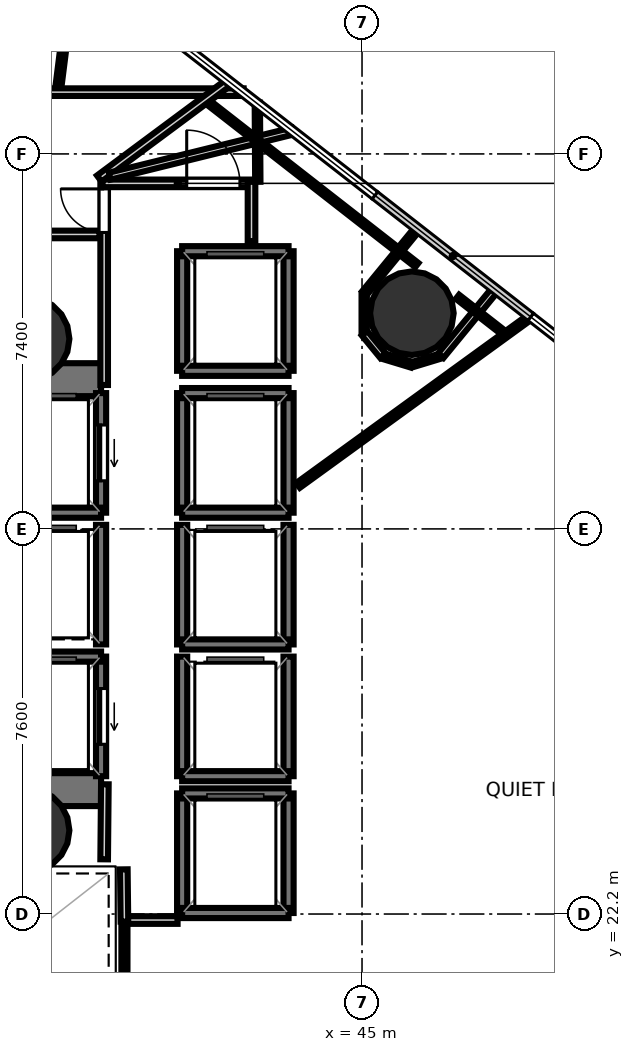
"""IFC4 building model, lengths in metres.
Left out: names, types, materials, properties, quantities, classifications, styles, units other than length and angle.
Written with IfcOpenShell. Run it as: python <this file> out.ifc"""

import sys

from ifc_helpers import new_model, si_unit, direction, frame, frame_2d, origin, origin_2d, place, context, subcontext, project, spatial, rectangle, hollow_circle, extrude, element, fill, save


model = new_model("IFC4")
c1 = context("Model", 3, precision=1e-05, world=origin(), true_north=direction((0.0, 1.0)))
c2 = subcontext(c1, "Body", "Model", "MODEL_VIEW")
j1 = project(units=[si_unit("LENGTHUNIT", "METRE"), si_unit("PLANEANGLEUNIT", "RADIAN")], contexts=[c1])
p1 = place(None, origin())
s1 = spatial("IfcSite", under=j1, at=p1, CompositionType="ELEMENT")
p2 = place(p1, origin())
s2 = spatial("IfcBuilding", under=s1, at=p2, CompositionType="ELEMENT")
p3 = place(p2, frame((0.0, 0.0, 85.8)))
s3 = spatial("IfcBuildingStorey", under=s2, at=p3, CompositionType="ELEMENT", Elevation=85.8)
p4 = place(p3, frame((29.13, 32.745, 0.0), z_axis=(0.0, 0.0, 1.0), x_axis=(1.0, 0.0, 0.0)))
e1 = element("IfcWall", 1, at=p4, inside=s3, PredefinedType="SHEAR", context=c2, shape_type="SweptSolid", body=[
    extrude(rectangle(XDim=10.72, YDim=0.65, at=frame_2d((5.36, 0.0))), origin(), (0.0, 0.0, 1.0), 3.52),
])
p5 = place(p4, frame((1.095, 0.0, 0.0)))
e2 = element("IfcOpeningElement", 2, at=p5, cuts=e1, PredefinedType="OPENING", context=c2, shape_type="SweptSolid", body=[
    extrude(rectangle(XDim=1.25, YDim=2.15, at=frame_2d((0.625, 1.075))), frame((0.0, 0.335, 0.0), z_axis=(0.0, -1.0, 0.0), x_axis=(1.0, 0.0, 0.0)), (0.0, 0.0, 1.0), 0.67),
])
p6 = place(p3, frame((29.13, 24.655, 0.0), z_axis=(0.0, 0.0, 1.0), x_axis=(1.0, 0.0, 0.0)))
e3 = element("IfcWall", 3, at=p6, inside=s3, PredefinedType="SHEAR", context=c2, shape_type="SweptSolid", body=[
    extrude(rectangle(XDim=10.72, YDim=0.65, at=frame_2d((5.36, 0.0))), origin(), (0.0, 0.0, 1.0), 3.52),
])
p7 = place(p6, frame((0.895, 0.0, 0.0)))
e4 = element("IfcOpeningElement", 4, at=p7, cuts=e3, PredefinedType="OPENING", context=c2, shape_type="SweptSolid", body=[
    extrude(rectangle(XDim=1.25, YDim=2.15, at=frame_2d((0.625, 1.075))), frame((0.0, 0.335, 0.0), z_axis=(0.0, -1.0, 0.0), x_axis=(1.0, 0.0, 0.0)), (0.0, 0.0, 1.0), 0.67),
])
for number, where, z_axis, x_axis in (
    (5, (38.4, 33.55, 0.0), (0.0, 0.0, 1.0), (1.0, 0.0, 0.0)),
    (6, (38.4, 23.85, 0.0), (0.0, 0.0, 1.0), (1.0, 0.0, 0.0)),
    (7, (45.984, 34.057, 0.0), (0.0, 0.0, 1.0), (1.0, 0.0, 0.0)),
):
    element("IfcColumn", number, at=place(p3, frame(where, z_axis=z_axis, x_axis=x_axis)), inside=s3, PredefinedType="COLUMN", context=c2, shape_type="SweptSolid", body=[
        extrude(hollow_circle(Radius=0.825, WallThickness=0.04, at=origin_2d()), origin(), (0.0, 0.0, 1.0), 3.7),
    ])
p8 = place(p3, frame((39.85, 30.12, 0.0), z_axis=(0.0, 0.0, 1.0), x_axis=(0.0, 1.0, 0.0)))
e8 = element("IfcWall", 8, at=p8, inside=s3, PredefinedType="SOLIDWALL", context=c2, shape_type="SweptSolid", body=[
    extrude(rectangle(XDim=2.36, YDim=0.2, at=frame_2d((1.18, 0.0))), origin(), (0.0, 0.0, 1.0), 3.52),
])
p9 = place(p8, frame((0.63, 0.0, 0.0)))
e9 = element("IfcOpeningElement", 9, at=p9, cuts=e8, PredefinedType="OPENING", context=c2, shape_type="SweptSolid", body=[
    extrude(rectangle(XDim=1.1, YDim=2.15, at=frame_2d((0.55, 1.075))), frame((0.0, 0.11, 0.0), z_axis=(0.0, -1.0, 0.0), x_axis=(1.0, 0.0, 0.0)), (0.0, 0.0, 1.0), 0.22),
])
p10 = place(p3, frame((37.75, 30.12, 0.0), z_axis=(0.0, 0.0, 1.0), x_axis=(1.0, 0.0, 0.0)))
e10 = element("IfcWall", 10, at=p10, inside=s3, PredefinedType="SOLIDWALL", context=c2, shape_type="SweptSolid", body=[
    extrude(rectangle(XDim=2.1, YDim=0.2, at=frame_2d((1.05, 0.0))), origin(), (0.0, 0.0, 1.0), 3.52),
])
p11 = place(p3, frame((39.85, 24.92, 0.0), z_axis=(0.0, 0.0, 1.0), x_axis=(0.0, 1.0, 0.0)))
e11 = element("IfcWall", 11, at=p11, inside=s3, PredefinedType="SOLIDWALL", context=c2, shape_type="SweptSolid", body=[
    extrude(rectangle(XDim=2.36, YDim=0.2, at=frame_2d((1.18, 0.0))), origin(), (0.0, 0.0, 1.0), 3.52),
])
p12 = place(p11, frame((0.63, 0.0, 0.0)))
e12 = element("IfcOpeningElement", 12, at=p12, cuts=e11, PredefinedType="OPENING", context=c2, shape_type="SweptSolid", body=[
    extrude(rectangle(XDim=1.1, YDim=2.15, at=frame_2d((0.55, 1.075))), frame((0.0, 0.11, 0.0), z_axis=(0.0, -1.0, 0.0), x_axis=(1.0, 0.0, 0.0)), (0.0, 0.0, 1.0), 0.22),
])
p13 = place(p3, frame((37.75, 27.28, 0.0), z_axis=(0.0, 0.0, 1.0), x_axis=(1.0, 0.0, 0.0)))
e13 = element("IfcWall", 13, at=p13, inside=s3, PredefinedType="SOLIDWALL", context=c2, shape_type="SweptSolid", body=[
    extrude(rectangle(XDim=2.1, YDim=0.2, at=frame_2d((1.05, 0.0))), origin(), (0.0, 0.0, 1.0), 3.52),
])
for number, where, z_axis, x_axis in (
    (14, (43.55, 30.12, 0.0), (0.0, 0.0, 1.0), (0.0, 1.0, 0.0)),
    (15, (41.45, 30.12, 0.0), (0.0, 0.0, 1.0), (0.0, 1.0, 0.0)),
):
    element("IfcWall", number, at=place(p3, frame(where, z_axis=z_axis, x_axis=x_axis)), inside=s3, PredefinedType="SOLIDWALL", context=c2, shape_type="SweptSolid", body=[
        extrude(rectangle(XDim=2.36, YDim=0.2, at=frame_2d((1.18, 0.0))), origin(), (0.0, 0.0, 1.0), 3.52),
    ])
for number, where, z_axis, x_axis in (
    (16, (41.45, 32.48, 0.0), (0.0, 0.0, 1.0), (1.0, 0.0, 0.0)),
    (17, (41.45, 30.12, 0.0), (0.0, 0.0, 1.0), (1.0, 0.0, 0.0)),
):
    element("IfcWall", number, at=place(p3, frame(where, z_axis=z_axis, x_axis=x_axis)), inside=s3, PredefinedType="SOLIDWALL", context=c2, shape_type="SweptSolid", body=[
        extrude(rectangle(XDim=2.1, YDim=0.2, at=frame_2d((1.05, 0.0))), origin(), (0.0, 0.0, 1.0), 3.52),
    ])
for number, where, z_axis, x_axis in (
    (18, (43.55, 27.52, 0.0), (0.0, 0.0, 1.0), (0.0, 1.0, 0.0)),
    (19, (41.45, 27.52, 0.0), (0.0, 0.0, 1.0), (0.0, 1.0, 0.0)),
):
    element("IfcWall", number, at=place(p3, frame(where, z_axis=z_axis, x_axis=x_axis)), inside=s3, PredefinedType="SOLIDWALL", context=c2, shape_type="SweptSolid", body=[
        extrude(rectangle(XDim=2.36, YDim=0.2, at=frame_2d((1.18, 0.0))), origin(), (0.0, 0.0, 1.0), 3.52),
    ])
p14 = place(p3, frame((41.45, 27.52, 0.0), z_axis=(0.0, 0.0, 1.0), x_axis=(1.0, 0.0, 0.0)))
e20 = element("IfcWall", 20, at=p14, inside=s3, PredefinedType="SOLIDWALL", context=c2, shape_type="SweptSolid", body=[
    extrude(rectangle(XDim=2.1, YDim=0.2, at=frame_2d((1.05, 0.0))), origin(), (0.0, 0.0, 1.0), 3.52),
])
for number, where, z_axis, x_axis in (
    (21, (43.55, 24.92, 0.0), (0.0, 0.0, 1.0), (0.0, 1.0, 0.0)),
    (22, (41.45, 24.92, 0.0), (0.0, 0.0, 1.0), (0.0, 1.0, 0.0)),
):
    element("IfcWall", number, at=place(p3, frame(where, z_axis=z_axis, x_axis=x_axis)), inside=s3, PredefinedType="SOLIDWALL", context=c2, shape_type="SweptSolid", body=[
        extrude(rectangle(XDim=2.36, YDim=0.2, at=frame_2d((1.18, 0.0))), origin(), (0.0, 0.0, 1.0), 3.52),
    ])
p15 = place(p3, frame((41.45, 24.92, 0.0), z_axis=(0.0, 0.0, 1.0), x_axis=(1.0, 0.0, 0.0)))
e23 = element("IfcWall", 23, at=p15, inside=s3, PredefinedType="SOLIDWALL", context=c2, shape_type="SweptSolid", body=[
    extrude(rectangle(XDim=2.1, YDim=0.2, at=frame_2d((1.05, 0.0))), origin(), (0.0, 0.0, 1.0), 3.52),
])
p16 = place(p3, frame((39.85, 27.52, 0.0), z_axis=(0.0, 0.0, 1.0), x_axis=(0.0, 1.0, 0.0)))
e24 = element("IfcWall", 24, at=p16, inside=s3, PredefinedType="SOLIDWALL", context=c2, shape_type="SweptSolid", body=[
    extrude(rectangle(XDim=2.36, YDim=0.2, at=frame_2d((1.18, 0.0))), origin(), (0.0, 0.0, 1.0), 3.52),
])
for number, where, z_axis, x_axis in (
    (25, (43.55, 22.22, 0.0), (0.0, 0.0, 1.0), (0.0, 1.0, 0.0)),
    (26, (41.45, 22.22, 0.0), (0.0, 0.0, 1.0), (0.0, 1.0, 0.0)),
):
    element("IfcWall", number, at=place(p3, frame(where, z_axis=z_axis, x_axis=x_axis)), inside=s3, PredefinedType="SOLIDWALL", context=c2, shape_type="SweptSolid", body=[
        extrude(rectangle(XDim=2.36, YDim=0.2, at=frame_2d((1.18, 0.0))), origin(), (0.0, 0.0, 1.0), 3.52),
    ])
for number, where, z_axis, x_axis in (
    (27, (41.45, 24.58, 0.0), (0.0, 0.0, 1.0), (1.0, 0.0, 0.0)),
    (28, (41.45, 22.22, 0.0), (0.0, 0.0, 1.0), (1.0, 0.0, 0.0)),
):
    element("IfcWall", number, at=place(p3, frame(where, z_axis=z_axis, x_axis=x_axis)), inside=s3, PredefinedType="SOLIDWALL", context=c2, shape_type="SweptSolid", body=[
        extrude(rectangle(XDim=2.1, YDim=0.2, at=frame_2d((1.05, 0.0))), origin(), (0.0, 0.0, 1.0), 3.52),
    ])
for number, where, z_axis, x_axis in (
    (29, (43.55, 32.92, 0.0), (0.0, 0.0, 1.0), (0.0, 1.0, 0.0)),
    (30, (41.45, 32.92, 0.0), (0.0, 0.0, 1.0), (0.0, 1.0, 0.0)),
):
    element("IfcWall", number, at=place(p3, frame(where, z_axis=z_axis, x_axis=x_axis)), inside=s3, PredefinedType="SOLIDWALL", context=c2, shape_type="SweptSolid", body=[
        extrude(rectangle(XDim=2.36, YDim=0.2, at=frame_2d((1.18, 0.0))), origin(), (0.0, 0.0, 1.0), 3.52),
    ])
for number, where, z_axis, x_axis in (
    (31, (41.45, 35.28, 0.0), (0.0, 0.0, 1.0), (1.0, 0.0, 0.0)),
    (32, (41.45, 32.92, 0.0), (0.0, 0.0, 1.0), (1.0, 0.0, 0.0)),
):
    element("IfcWall", number, at=place(p3, frame(where, z_axis=z_axis, x_axis=x_axis)), inside=s3, PredefinedType="SOLIDWALL", context=c2, shape_type="SweptSolid", body=[
        extrude(rectangle(XDim=2.1, YDim=0.2, at=frame_2d((1.05, 0.0))), origin(), (0.0, 0.0, 1.0), 3.52),
    ])
p17 = place(p3, frame((39.911, 32.64, 0.0), z_axis=(0.0, 0.0, 1.0), x_axis=(0.0, 1.0, 0.0)))
e33 = element("IfcWall", 33, at=p17, inside=s3, PredefinedType="PARTITIONING", context=c2, shape_type="SweptSolid", body=[
    extrude(rectangle(XDim=4.01, YDim=0.15, at=frame_2d((2.005, 0.0))), origin(), (0.0, 0.0, 1.0), 2.84),
])
p18 = place(p17, frame((3.01, 0.0, 0.0)))
e34 = element("IfcOpeningElement", 34, at=p18, cuts=e33, PredefinedType="OPENING", context=c2, shape_type="SweptSolid", body=[
    extrude(rectangle(XDim=0.86, YDim=2.05, at=frame_2d((0.43, 1.025))), frame((0.0, 0.085, 0.0), z_axis=(0.0, -1.0, 0.0), x_axis=(1.0, 0.0, 0.0)), (0.0, 0.0, 1.0), 0.17),
])
p19 = place(p3, frame((39.88, 36.619, 0.0), z_axis=(0.0, 0.0, 1.0), x_axis=(1.0, 0.0, 0.0)))
e35 = element("IfcWall", 35, at=p19, inside=s3, PredefinedType="PARTITIONING", context=c2, shape_type="SweptSolid", body=[
    extrude(rectangle(XDim=2.97, YDim=0.15, at=frame_2d((1.485, 0.0))), origin(), (0.0, 0.0, 1.0), 2.798),
])
p20 = place(p19, frame((1.66, 0.0, 0.0)))
e36 = element("IfcOpeningElement", 36, at=p20, cuts=e35, PredefinedType="OPENING", context=c2, shape_type="SweptSolid", body=[
    extrude(rectangle(XDim=1.05, YDim=2.15, at=frame_2d((0.525, 1.075))), frame((0.0, 0.085, 0.0), z_axis=(0.0, -1.0, 0.0), x_axis=(1.0, 0.0, 0.0)), (0.0, 0.0, 1.0), 0.17),
])
p21 = place(p3, frame((42.819, 36.65, 0.0), z_axis=(0.0, 0.0, 1.0), x_axis=(0.0, -1.0, 0.0)))
e37 = element("IfcWall", 37, at=p21, inside=s3, PredefinedType="PARTITIONING", context=c2, shape_type="SweptSolid", body=[
    extrude(rectangle(XDim=1.17, YDim=0.15, at=frame_2d((0.585, 0.0))), origin(), (0.0, 0.0, 1.0), 2.798),
])
p22 = place(p3, frame((41.36, 22.081, 0.0), z_axis=(0.0, 0.0, 1.0), x_axis=(-1.0, 0.0, 0.0)))
e38 = element("IfcWall", 38, at=p22, inside=s3, PredefinedType="PARTITIONING", context=c2, shape_type="SweptSolid", body=[
    extrude(rectangle(XDim=1.08, YDim=0.15, at=frame_2d((0.54, 0.0))), origin(), (0.0, 0.0, 1.0), 2.84),
])
p23 = place(p3, frame((40.311, 22.05, 0.0), z_axis=(0.0, 0.0, 1.0), x_axis=(-0.011836292006, 0.999929948642, 0.0)))
e39 = element("IfcWall", 39, at=p23, inside=s3, PredefinedType="PARTITIONING", context=c2, shape_type="SweptSolid", body=[
    extrude(rectangle(XDim=1.031, YDim=0.15, at=frame_2d((0.516, 0.0))), origin(), (0.0, 0.0, 1.0), 2.84),
])
p24 = place(p3, frame((39.911, 23.28, 0.0), z_axis=(0.0, 0.0, 1.0), x_axis=(0.009397771291, 0.999955839972, 0.0)))
e40 = element("IfcWall", 40, at=p24, inside=s3, PredefinedType="PARTITIONING", context=c2, shape_type="SweptSolid", body=[
    extrude(rectangle(XDim=1.481, YDim=0.15, at=frame_2d((0.74, 0.0))), origin(), (0.0, 0.0, 1.0), 2.84),
])
p25 = place(p3, frame((26.42, 38.419, 0.0), z_axis=(0.0, 0.0, 1.0), x_axis=(1.0, 0.0, 0.0)))
e41 = element("IfcWall", 41, at=p25, inside=s3, PredefinedType="PARTITIONING", context=c2, shape_type="SweptSolid", body=[
    extrude(rectangle(XDim=16.243, YDim=0.15, at=frame_2d((8.122, 0.0))), origin(), (0.0, 0.0, 1.0), 2.798),
])
p26 = place(p25, frame((8.406, 0.0, 0.0)))
e42 = element("IfcOpeningElement", 42, at=p26, cuts=e41, PredefinedType="OPENING", context=c2, shape_type="SweptSolid", body=[
    extrude(rectangle(XDim=1.25, YDim=2.2, at=frame_2d((0.625, 1.1))), frame((0.0, 0.085, 0.0), z_axis=(0.0, -1.0, 0.0), x_axis=(1.0, 0.0, 0.0)), (0.0, 0.0, 1.0), 0.17),
])
p27 = place(p3, frame((42.398, 38.634, 0.0), z_axis=(0.0, 0.0, 1.0), x_axis=(-0.802766662885, -0.596293287704, 0.0)))
e43 = element("IfcWall", 43, at=p27, inside=s3, PredefinedType="PARTITIONING", context=c2, shape_type="SweptSolid", body=[
    extrude(rectangle(XDim=3.22, YDim=0.15, at=frame_2d((1.61, 0.0))), origin(), (0.0, 0.0, 1.0), 2.798),
])
p28 = place(p3, frame((39.818, 35.611, 0.0), z_axis=(0.0, 0.0, 1.0), x_axis=(-1.0, 0.0, 0.0)))
e44 = element("IfcWall", 44, at=p28, inside=s3, PredefinedType="PARTITIONING", context=c2, shape_type="SweptSolid", body=[
    extrude(rectangle(XDim=2.768, YDim=0.15, at=frame_2d((1.384, 0.0))), origin(), (0.0, 0.0, 1.0), 2.84),
])
p29 = place(p3, frame((40.311, 18.0, 0.0), z_axis=(0.0, 0.0, 1.0), x_axis=(0.0, 1.0, 0.0)))
e45 = element("IfcWall", 45, at=p29, inside=s3, PredefinedType="PARTITIONING", context=c2, shape_type="SweptSolid", body=[
    extrude(rectangle(XDim=3.97, YDim=0.12, at=frame_2d((1.985, 0.0))), origin(), (0.0, 0.0, 1.0), 2.84),
])
p30 = place(p3, frame((43.738, 30.659, 0.0), z_axis=(0.0, 0.0, 1.0), x_axis=(0.809324205452, 0.587362179979, 0.0)))
e46 = element("IfcWall", 46, at=p30, inside=s3, PredefinedType="PARTITIONING", context=c2, shape_type="SweptSolid", body=[
    extrude(rectangle(XDim=5.687, YDim=0.12, at=frame_2d((2.843, 0.0))), origin(), (0.0, 0.0, 1.0), 2.798),
])
p31 = place(p3, frame((42.943, 36.65, 0.0), z_axis=(0.0, 0.0, 1.0), x_axis=(-0.005939251293, 0.999982362491, 0.0)))
e47 = element("IfcWall", 47, at=p31, inside=s3, PredefinedType="PARTITIONING", context=c2, shape_type="SweptSolid", body=[
    extrude(rectangle(XDim=1.562, YDim=0.105, at=frame_2d((0.781, 0.0))), origin(), (0.0, 0.0, 1.0), 2.84),
])
p32 = place(p3, frame((43.629, 37.65, 0.0), z_axis=(0.0, 0.0, 1.0), x_axis=(-0.970941159408, -0.239318333958, 0.0)))
e48 = element("IfcWall", 48, at=p32, inside=s3, PredefinedType="PARTITIONING", context=c2, shape_type="SweptSolid", body=[
    extrude(rectangle(XDim=3.715, YDim=0.14, at=frame_2d((1.858, 0.0))), origin(), (0.0, 0.0, 1.0), 2.798),
])
p33 = place(p3, frame((41.998, 38.192, 0.0), z_axis=(0.0, 0.0, 1.0), x_axis=(0.78851647787, -0.615013629221, 0.0)))
e49 = element("IfcWall", 49, at=p33, inside=s3, PredefinedType="PARTITIONING", context=c2, shape_type="SweptSolid", body=[
    extrude(rectangle(XDim=5.18, YDim=0.105, at=frame_2d((2.59, 0.0))), origin(), (0.0, 0.0, 1.0), 2.798),
])
p34 = place(p3, frame((46.107, 35.742, 0.0), z_axis=(0.0, 0.0, 1.0), x_axis=(-0.634345789396, -0.773049428869, 0.0)))
e50 = element("IfcWall", 50, at=p34, inside=s3, PredefinedType="PARTITIONING", context=c2, shape_type="SweptSolid", body=[
    extrude(rectangle(XDim=1.667, YDim=0.12, at=frame_2d((0.833, 0.0))), origin(), (0.0, 0.0, 1.0), 2.798),
])
p35 = place(p3, frame((45.043, 34.434, 0.0), z_axis=(0.0, 0.0, 1.0), x_axis=(0.0, -1.0, 0.0)))
e51 = element("IfcWall", 51, at=p35, inside=s3, PredefinedType="PARTITIONING", context=c2, shape_type="SweptSolid", body=[
    extrude(rectangle(XDim=0.754, YDim=0.105, at=frame_2d((0.377, 0.0))), origin(), (0.0, 0.0, 1.0), 2.84),
])
p36 = place(p3, frame((45.05, 33.66, 0.0), z_axis=(0.0, 0.0, 1.0), x_axis=(0.634329694458, -0.773062635709, 0.0)))
e52 = element("IfcWall", 52, at=p36, inside=s3, PredefinedType="PARTITIONING", context=c2, shape_type="SweptSolid", body=[
    extrude(rectangle(XDim=0.572, YDim=0.14, at=frame_2d((0.286, 0.0))), origin(), (0.0, 0.0, 1.0), 2.84),
])
p37 = place(p3, frame((45.428, 33.208, 0.0), z_axis=(0.0, 0.0, 1.0), x_axis=(0.956952578659, -0.290244314669, 0.0)))
e53 = element("IfcWall", 53, at=p37, inside=s3, PredefinedType="PARTITIONING", context=c2, shape_type="SweptSolid", body=[
    extrude(rectangle(XDim=0.572, YDim=0.12, at=frame_2d((0.286, 0.0))), origin(), (0.0, 0.0, 1.0), 2.84),
])
p38 = place(p3, frame((45.993, 33.042, 0.0), z_axis=(0.0, 0.0, 1.0), x_axis=(0.956952578659, 0.290244314669, 0.0)))
e54 = element("IfcWall", 54, at=p38, inside=s3, PredefinedType="PARTITIONING", context=c2, shape_type="SweptSolid", body=[
    extrude(rectangle(XDim=0.572, YDim=0.105, at=frame_2d((0.286, 0.0))), origin(), (0.0, 0.0, 1.0), 2.798),
])
p39 = place(p3, frame((46.555, 33.218, 0.0), z_axis=(0.0, 0.0, 1.0), x_axis=(0.634384225062, 0.773017887887, 0.0)))
e55 = element("IfcWall", 55, at=p39, inside=s3, PredefinedType="PARTITIONING", context=c2, shape_type="SweptSolid", body=[
    extrude(rectangle(XDim=1.715, YDim=0.14, at=frame_2d((0.858, 0.0))), origin(), (0.0, 0.0, 1.0), 2.798),
])
p40 = place(p3, frame((46.884, 34.381, 0.0), z_axis=(0.0, 0.0, 1.0), x_axis=(0.78862657749, -0.614872443094, 0.0)))
e56 = element("IfcWall", 56, at=p40, inside=s3, PredefinedType="PARTITIONING", context=c2, shape_type="SweptSolid", body=[
    extrude(rectangle(XDim=1.124, YDim=0.105, at=frame_2d((0.562, 0.0))), origin(), (0.0, 0.0, 1.0), 2.84),
])
p41 = place(p3, frame((39.325, 41.029, 0.0), z_axis=(0.0, 0.0, 1.0), x_axis=(-0.125337063775, -0.992114217439, 0.0)))
e57 = element("IfcWall", 57, at=p41, inside=s3, PredefinedType="PARTITIONING", context=c2, shape_type="SweptSolid", body=[
    extrude(rectangle(XDim=2.515, YDim=0.12, at=frame_2d((1.257, 0.0))), origin(), (0.0, 0.0, 1.0), 2.798),
])
p42 = place(p9, origin())
e58 = element("IfcDoor", 58, at=p42, inside=s3, OperationType="SLIDING_TO_LEFT", PredefinedType="DOOR", context=c2, shape_type="SweptSolid", body=[
    extrude(rectangle(XDim=1.1, YDim=2.15, at=frame_2d((0.55, 1.075))), frame((0.0, 0.025, 0.0), z_axis=(0.0, -1.0, 0.0), x_axis=(1.0, 0.0, 0.0)), (0.0, 0.0, 1.0), 0.05),
])
fill(e9, e58)
p43 = place(p12, origin())
e59 = element("IfcDoor", 59, at=p43, inside=s3, OperationType="SLIDING_TO_LEFT", PredefinedType="DOOR", context=c2, shape_type="SweptSolid", body=[
    extrude(rectangle(XDim=1.1, YDim=2.15, at=frame_2d((0.55, 1.075))), frame((0.0, 0.025, 0.0), z_axis=(0.0, -1.0, 0.0), x_axis=(1.0, 0.0, 0.0)), (0.0, 0.0, 1.0), 0.05),
])
fill(e12, e59)
p44 = place(p18, origin())
e60 = element("IfcDoor", 60, at=p44, inside=s3, OperationType="SINGLE_SWING_RIGHT", PredefinedType="DOOR", context=c2, shape_type="SweptSolid", body=[
    extrude(rectangle(XDim=0.86, YDim=2.05, at=frame_2d((0.43, 1.025))), frame((0.0, 0.025, 0.0), z_axis=(0.0, -1.0, 0.0), x_axis=(1.0, 0.0, 0.0)), (0.0, 0.0, 1.0), 0.05),
])
fill(e34, e60)
p45 = place(p20, origin())
e61 = element("IfcDoor", 61, at=p45, inside=s3, OperationType="SINGLE_SWING_LEFT", PredefinedType="DOOR", context=c2, shape_type="SweptSolid", body=[
    extrude(rectangle(XDim=1.05, YDim=2.15, at=frame_2d((0.525, 1.075))), frame((0.0, 0.025, 0.0), z_axis=(0.0, -1.0, 0.0), x_axis=(1.0, 0.0, 0.0)), (0.0, 0.0, 1.0), 0.05),
])
fill(e36, e61)
save(model, sys.argv[1])
